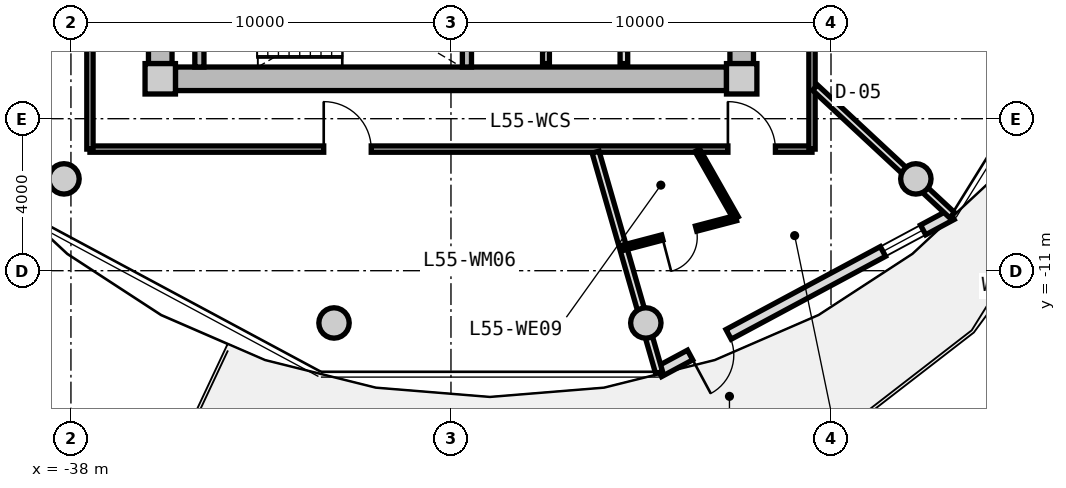
"""IFC4 building model, lengths in metres.
Left out: names, types, materials, properties, quantities, classifications, styles, units other than length and angle.
Written with IfcOpenShell. Run it as: python <this file> out.ifc"""

import sys

from ifc_helpers import new_model, si_unit, direction, frame, frame_2d, origin, origin_2d, place, context, subcontext, project, spatial, rectangle, circle, extrude, source, transform, mapped, element, fill, save


model = new_model("IFC4")
c1 = context("Model", 3, precision=1e-05, world=origin(), true_north=direction((0.0, 1.0)))
c2 = subcontext(c1, "Body", "Model", "MODEL_VIEW")
j1 = project(units=[si_unit("LENGTHUNIT", "METRE"), si_unit("PLANEANGLEUNIT", "RADIAN")], contexts=[c1])
p1 = place(None, origin())
s1 = spatial("IfcSite", under=j1, at=p1, CompositionType="ELEMENT")
p2 = place(p1, origin())
s2 = spatial("IfcBuilding", under=s1, at=p2, CompositionType="ELEMENT")
p3 = place(p2, frame((0.0, 0.0, 177.0)))
s3 = spatial("IfcBuildingStorey", under=s2, at=p3, CompositionType="ELEMENT", Elevation=177.0)
m1 = source(origin(), c2, "Body", "SweptSolid", [
    extrude(rectangle(XDim=0.8, YDim=0.8, at=origin_2d()), origin(), (0.0, 0.0, 1.0), 3.05),
])
for number, where, z_axis, x_axis in (
    (1, (-35.65, -5.95, 0.0), (0.0, 0.0, 1.0), (1.0, 0.0, 0.0)),
    (2, (-20.35, -5.95, 0.0), (0.0, 0.0, 1.0), (1.0, 0.0, 0.0)),
):
    element("IfcColumn", number, at=place(p3, frame(where, z_axis=z_axis, x_axis=x_axis)), inside=s3, PredefinedType="COLUMN", context=c2, shape_type="MappedRepresentation", body=[
        mapped(m1, transform((0.0, 0.0, 0.0), x_axis=(1.0, 0.0, 0.0), y_axis=(0.0, 1.0, 0.0), z_axis=(0.0, 0.0, 1.0), scale=1.0)),
    ])
m2 = source(origin(), c2, "Body", "SweptSolid", [
    extrude(rectangle(XDim=14.5, YDim=0.62, at=frame_2d((7.25, 0.0))), origin(), (0.0, 0.0, 1.0), 2.81),
])
p4 = place(p3, frame((-20.75, -5.95, 0.0), z_axis=(0.0, 0.0, 1.0), x_axis=(-1.0, 0.0, 0.0)))
e3 = element("IfcWall", 3, at=p4, inside=s3, PredefinedType="SHEAR", context=c2, shape_type="MappedRepresentation", body=[
    mapped(m2, transform((0.0, 0.0, 0.0), x_axis=(1.0, 0.0, 0.0), y_axis=(0.0, 1.0, 0.0), z_axis=(0.0, 0.0, 1.0), scale=1.0)),
])
m3 = source(origin(), c2, "Body", "SweptSolid", [
    extrude(rectangle(XDim=11.1, YDim=0.62, at=frame_2d((5.55, 0.0))), origin(), (0.0, 0.0, 1.0), 2.81),
])
p5 = place(p3, frame((-35.65, -5.55, 0.0), z_axis=(0.0, 0.0, 1.0), x_axis=(0.0, 1.0, 0.0)))
e4 = element("IfcWall", 4, at=p5, inside=s3, PredefinedType="SHEAR", context=c2, shape_type="MappedRepresentation", body=[
    mapped(m3, transform((0.0, 0.0, 0.0), x_axis=(1.0, 0.0, 0.0), y_axis=(0.0, 1.0, 0.0), z_axis=(0.0, 0.0, 1.0), scale=1.0)),
])
p6 = place(p5, frame((3.8, 0.0, 0.0)))
e5 = element("IfcOpeningElement", 5, at=p6, cuts=e4, PredefinedType="OPENING", context=c2, shape_type="SweptSolid", body=[
    extrude(rectangle(XDim=1.2, YDim=2.15, at=frame_2d((0.6, 1.075))), frame((0.0, 0.32, 0.0), z_axis=(0.0, -1.0, 0.0), x_axis=(1.0, 0.0, 0.0)), (0.0, 0.0, 1.0), 0.64),
])
p7 = place(p3, frame((-20.35, 5.55, 0.0), z_axis=(0.0, 0.0, 1.0), x_axis=(0.0, -1.0, 0.0)))
e6 = element("IfcWall", 6, at=p7, inside=s3, PredefinedType="SHEAR", context=c2, shape_type="MappedRepresentation", body=[
    mapped(m3, transform((0.0, 0.0, 0.0), x_axis=(1.0, 0.0, 0.0), y_axis=(0.0, 1.0, 0.0), z_axis=(0.0, 0.0, 1.0), scale=1.0)),
])
p8 = place(p7, frame((5.65, 0.0, 0.0)))
e7 = element("IfcOpeningElement", 7, at=p8, cuts=e6, PredefinedType="OPENING", context=c2, shape_type="SweptSolid", body=[
    extrude(rectangle(XDim=1.2, YDim=2.15, at=frame_2d((0.6, 1.075))), frame((0.0, 0.32, 0.0), z_axis=(0.0, -1.0, 0.0), x_axis=(1.0, 0.0, 0.0)), (0.0, 0.0, 1.0), 0.64),
])
m4 = source(origin(), c2, "Body", "SweptSolid", [
    extrude(circle(Radius=0.4, at=origin_2d()), origin(), (0.0, 0.0, 1.0), 3.05),
])
for number, where, z_axis, x_axis in (
    (8, (-38.183, -8.584, 0.0), (0.0, 0.0, 1.0), (1.0, 0.0, 0.0)),
    (9, (-31.077, -12.375, 0.0), (0.0, 0.0, 1.0), (1.0, 0.0, 0.0)),
    (10, (-22.873, -12.375, 0.0), (0.0, 0.0, 1.0), (1.0, 0.0, 0.0)),
    (11, (-15.767, -8.584, 0.0), (0.0, 0.0, 1.0), (1.0, 0.0, 0.0)),
):
    element("IfcColumn", number, at=place(p3, frame(where, z_axis=z_axis, x_axis=x_axis)), inside=s3, PredefinedType="COLUMN", context=c2, shape_type="MappedRepresentation", body=[
        mapped(m4, transform((0.0, 0.0, 0.0), x_axis=(1.0, 0.0, 0.0), y_axis=(0.0, 1.0, 0.0), z_axis=(0.0, 0.0, 1.0), scale=1.0)),
    ])
m5 = source(origin(), c2, "Body", "SweptSolid", [
    extrude(rectangle(XDim=8.742, YDim=0.29, at=frame_2d((4.371, 0.0))), origin(), (0.0, 0.0, 1.0), 2.81),
])
p9 = place(p3, frame((-14.827, -9.524, 0.0), z_axis=(0.0, 0.0, 1.0), x_axis=(-0.880998740657, -0.473118609823, 0.0)))
e12 = element("IfcWall", 12, at=p9, inside=s3, PredefinedType="SOLIDWALL", context=c2, shape_type="MappedRepresentation", body=[
    mapped(m5, transform((0.0, 0.0, 0.0), x_axis=(1.0, 0.0, 0.0), y_axis=(0.0, 1.0, 0.0), z_axis=(0.0, 0.0, 1.0), scale=1.0)),
])
p10 = place(p9, frame((6.66, 0.0, 0.0)))
e13 = element("IfcOpeningElement", 13, at=p10, cuts=e12, PredefinedType="OPENING", context=c2, shape_type="SweptSolid", body=[
    extrude(rectangle(XDim=1.15, YDim=2.25, at=frame_2d((0.575, 1.125))), frame((0.0, 0.155, 0.0), z_axis=(0.0, -1.0, 0.0), x_axis=(1.0, 0.0, 0.0)), (0.0, 0.0, 1.0), 0.31),
])
p11 = place(p9, frame((0.85, 0.0, 0.85)))
e14 = element("IfcOpeningElement", 14, at=p11, cuts=e12, PredefinedType="OPENING", context=c2, shape_type="SweptSolid", body=[
    extrude(rectangle(XDim=1.2, YDim=1.5, at=frame_2d((0.6, 0.75))), frame((0.0, 0.155, 0.0), z_axis=(0.0, -1.0, 0.0), x_axis=(1.0, 0.0, 0.0)), (0.0, 0.0, 1.0), 0.31),
])
m6 = source(origin(), c2, "Body", "SweptSolid", [
    extrude(rectangle(XDim=3.19, YDim=0.24, at=frame_2d((1.595, 0.0))), origin(), (0.0, 0.0, 1.0), 2.81),
])
for number, where, z_axis, x_axis in (
    (15, (-34.62, -5.64, 0.0), (0.0, 0.0, 1.0), (0.0, 1.0, 0.0)),
    (16, (-27.58, -5.64, 0.0), (0.0, 0.0, 1.0), (0.0, 1.0, 0.0)),
):
    element("IfcWall", number, at=place(p3, frame(where, z_axis=z_axis, x_axis=x_axis)), inside=s3, PredefinedType="PARTITIONING", context=c2, shape_type="MappedRepresentation", body=[
        mapped(m6, transform((0.0, 0.0, 0.0), x_axis=(1.0, 0.0, 0.0), y_axis=(0.0, 1.0, 0.0), z_axis=(0.0, 0.0, 1.0), scale=1.0)),
    ])
m7 = source(origin(), c2, "Body", "SweptSolid", [
    extrude(rectangle(XDim=3.8, YDim=0.2, at=frame_2d((1.9, 0.0))), origin(), (0.0, 0.0, 1.0), 2.795),
])
p12 = place(p3, frame((-23.45, -5.55, 0.0), z_axis=(0.0, 0.0, 1.0), x_axis=(0.0, 1.0, 0.0)))
e17 = element("IfcWall", 17, at=p12, inside=s3, PredefinedType="PARTITIONING", context=c2, shape_type="MappedRepresentation", body=[
    mapped(m7, transform((0.0, 0.0, 0.0), x_axis=(1.0, 0.0, 0.0), y_axis=(0.0, 1.0, 0.0), z_axis=(0.0, 0.0, 1.0), scale=1.0)),
])
m8 = source(origin(), c2, "Body", "SweptSolid", [
    extrude(rectangle(XDim=4.2, YDim=0.18, at=frame_2d((2.1, 0.0))), origin(), (0.0, 0.0, 1.0), 2.795),
])
p13 = place(p3, frame((-25.5, -5.55, 0.0), z_axis=(0.0, 0.0, 1.0), x_axis=(0.0, 1.0, 0.0)))
e18 = element("IfcWall", 18, at=p13, inside=s3, PredefinedType="PARTITIONING", context=c2, shape_type="MappedRepresentation", body=[
    mapped(m8, transform((0.0, 0.0, 0.0), x_axis=(1.0, 0.0, 0.0), y_axis=(0.0, 1.0, 0.0), z_axis=(0.0, 0.0, 1.0), scale=1.0)),
])
m9 = source(origin(), c2, "Body", "SweptSolid", [
    extrude(rectangle(XDim=19.0, YDim=0.165, at=frame_2d((9.5, 0.0))), origin(), (0.0, 0.0, 1.0), 2.795),
])
p14 = place(p3, frame((-18.5, -7.8, 0.0), z_axis=(0.0, 0.0, 1.0), x_axis=(-1.0, 0.0, 0.0)))
e19 = element("IfcWall", 19, at=p14, inside=s3, PredefinedType="PARTITIONING", context=c2, shape_type="MappedRepresentation", body=[
    mapped(m9, transform((0.0, 0.0, 0.0), x_axis=(1.0, 0.0, 0.0), y_axis=(0.0, 1.0, 0.0), z_axis=(0.0, 0.0, 1.0), scale=1.0)),
])
p15 = place(p14, frame((11.598, 0.0, 0.0)))
e20 = element("IfcOpeningElement", 20, at=p15, cuts=e19, PredefinedType="OPENING", context=c2, shape_type="SweptSolid", body=[
    extrude(rectangle(XDim=1.25, YDim=2.2, at=frame_2d((0.625, 1.1))), frame((0.0, 0.093, 0.0), z_axis=(0.0, -1.0, 0.0), x_axis=(1.0, 0.0, 0.0)), (0.0, 0.0, 1.0), 0.185),
])
p16 = place(p14, frame((0.963, 0.0, 0.0)))
e21 = element("IfcOpeningElement", 21, at=p16, cuts=e19, PredefinedType="OPENING", context=c2, shape_type="SweptSolid", body=[
    extrude(rectangle(XDim=1.25, YDim=2.2, at=frame_2d((0.625, 1.1))), frame((0.0, 0.093, 0.0), z_axis=(0.0, -1.0, 0.0), x_axis=(1.0, 0.0, 0.0)), (0.0, 0.0, 1.0), 0.185),
])
m10 = source(origin(), c2, "Body", "SweptSolid", [
    extrude(rectangle(XDim=6.88, YDim=0.165, at=frame_2d((3.44, 0.0))), origin(), (0.0, 0.0, 1.0), 2.795),
])
p17 = place(p3, frame((-37.5, -7.8, 0.0), z_axis=(0.0, 0.0, 1.0), x_axis=(0.0, 1.0, 0.0)))
e22 = element("IfcWall", 22, at=p17, inside=s3, PredefinedType="PARTITIONING", context=c2, shape_type="MappedRepresentation", body=[
    mapped(m10, transform((0.0, 0.0, 0.0), x_axis=(1.0, 0.0, 0.0), y_axis=(0.0, 1.0, 0.0), z_axis=(0.0, 0.0, 1.0), scale=1.0)),
])
m11 = source(origin(), c2, "Body", "SweptSolid", [
    extrude(rectangle(XDim=7.365, YDim=0.165, at=frame_2d((3.682, 0.0))), origin(), (0.0, 0.0, 1.0), 2.795),
])
p18 = place(p3, frame((-18.5, -0.436, 0.0), z_axis=(0.0, 0.0, 1.0), x_axis=(0.0, -1.0, 0.0)))
e23 = element("IfcWall", 23, at=p18, inside=s3, PredefinedType="PARTITIONING", context=c2, shape_type="MappedRepresentation", body=[
    mapped(m11, transform((0.0, 0.0, 0.0), x_axis=(1.0, 0.0, 0.0), y_axis=(0.0, 1.0, 0.0), z_axis=(0.0, 0.0, 1.0), scale=1.0)),
])
p19 = place(p18, frame((2.433, 0.0, 0.0)))
e24 = element("IfcOpeningElement", 24, at=p19, cuts=e23, PredefinedType="OPENING", context=c2, shape_type="SweptSolid", body=[
    extrude(rectangle(XDim=1.25, YDim=2.2, at=frame_2d((0.625, 1.1))), frame((0.0, 0.093, 0.0), z_axis=(0.0, -1.0, 0.0), x_axis=(1.0, 0.0, 0.0)), (0.0, 0.0, 1.0), 0.185),
])
m12 = source(origin(), c2, "Body", "SweptSolid", [
    extrude(rectangle(XDim=6.035, YDim=0.19, at=frame_2d((3.018, 0.0))), origin(), (0.0, 0.0, 1.0), 2.345),
])
p20 = place(p3, frame((-24.194, -7.88, 0.0), z_axis=(0.0, 0.0, 1.0), x_axis=(0.276809454862, -0.960924828329, 0.0)))
e25 = element("IfcWall", 25, at=p20, inside=s3, PredefinedType="PARTITIONING", context=c2, shape_type="MappedRepresentation", body=[
    mapped(m12, transform((0.0, 0.0, 0.0), x_axis=(1.0, 0.0, 0.0), y_axis=(0.0, 1.0, 0.0), z_axis=(0.0, 0.0, 1.0), scale=1.0)),
])
m13 = source(origin(), c2, "Body", "SweptSolid", [
    extrude(rectangle(XDim=4.927, YDim=0.19, at=frame_2d((2.463, 0.0))), origin(), (0.0, 0.0, 1.0), 2.345),
])
p21 = place(p3, frame((-18.42, -6.183, 0.0), z_axis=(0.0, 0.0, 1.0), x_axis=(0.732191335987, -0.681098999783, 0.0)))
e26 = element("IfcWall", 26, at=p21, inside=s3, PredefinedType="PARTITIONING", context=c2, shape_type="MappedRepresentation", body=[
    mapped(m13, transform((0.0, 0.0, 0.0), x_axis=(1.0, 0.0, 0.0), y_axis=(0.0, 1.0, 0.0), z_axis=(0.0, 0.0, 1.0), scale=1.0)),
])
m14 = source(origin(), c2, "Body", "SweptSolid", [
    extrude(rectangle(XDim=2.055, YDim=0.14, at=frame_2d((1.027, 0.0))), origin(), (0.0, 0.0, 1.0), 2.795),
])
p22 = place(p3, frame((-21.516, -7.83, 0.0), z_axis=(0.0, 0.0, 1.0), x_axis=(0.494154336367, -0.869374195528, 0.0)))
e27 = element("IfcWall", 27, at=p22, inside=s3, PredefinedType="PARTITIONING", context=c2, shape_type="MappedRepresentation", body=[
    mapped(m14, transform((0.0, 0.0, 0.0), x_axis=(1.0, 0.0, 0.0), y_axis=(0.0, 1.0, 0.0), z_axis=(0.0, 0.0, 1.0), scale=1.0)),
])
m15 = source(origin(), c2, "Body", "SweptSolid", [
    extrude(rectangle(XDim=3.088, YDim=0.14, at=frame_2d((1.544, 0.0))), origin(), (0.0, 0.0, 1.0), 2.795),
])
p23 = place(p3, frame((-20.501, -9.616, 0.0), z_axis=(0.0, 0.0, 1.0), x_axis=(-0.967224898254, -0.253921240146, 0.0)))
e28 = element("IfcWall", 28, at=p23, inside=s3, PredefinedType="PARTITIONING", context=c2, shape_type="MappedRepresentation", body=[
    mapped(m15, transform((0.0, 0.0, 0.0), x_axis=(1.0, 0.0, 0.0), y_axis=(0.0, 1.0, 0.0), z_axis=(0.0, 0.0, 1.0), scale=1.0)),
])
p24 = place(p23, frame((1.084, 0.0, 0.0)))
e29 = element("IfcOpeningElement", 29, at=p24, cuts=e28, PredefinedType="OPENING", context=c2, shape_type="SweptSolid", body=[
    extrude(rectangle(XDim=0.92, YDim=2.1, at=frame_2d((0.46, 1.05))), frame((0.0, 0.08, 0.0), z_axis=(0.0, -1.0, 0.0), x_axis=(1.0, 0.0, 0.0)), (0.0, 0.0, 1.0), 0.16),
])
m16 = source(origin(), c2, "Body", "SweptSolid", [
    extrude(rectangle(XDim=1.15, YDim=2.25, at=frame_2d((0.575, 1.125))), frame((0.0, 0.025, 0.0), z_axis=(0.0, -1.0, 0.0), x_axis=(1.0, 0.0, 0.0)), (0.0, 0.0, 1.0), 0.05),
])
p25 = place(p10, origin())
e30 = element("IfcDoor", 30, at=p25, inside=s3, OperationType="SINGLE_SWING_RIGHT", PredefinedType="DOOR", context=c2, shape_type="MappedRepresentation", body=[
    mapped(m16, transform((0.0, 0.0, 0.0), x_axis=(1.0, 0.0, 0.0), y_axis=(0.0, 1.0, 0.0), z_axis=(0.0, 0.0, 1.0), scale=1.0)),
])
fill(e13, e30)
m17 = source(origin(), c2, "Body", "SweptSolid", [
    extrude(rectangle(XDim=1.2, YDim=1.5, at=frame_2d((0.6, 0.75))), frame((0.0, 0.03, 0.0), z_axis=(0.0, -1.0, 0.0), x_axis=(1.0, 0.0, 0.0)), (0.0, 0.0, 1.0), 0.06),
])
p26 = place(p11, origin())
e31 = element("IfcWindow", 31, at=p26, inside=s3, PartitioningType="SINGLE_PANEL", PredefinedType="WINDOW", context=c2, shape_type="MappedRepresentation", body=[
    mapped(m17, transform((0.0, 0.0, 0.0), x_axis=(1.0, 0.0, 0.0), y_axis=(0.0, 1.0, 0.0), z_axis=(0.0, 0.0, 1.0), scale=1.0)),
])
fill(e14, e31)
m18 = source(origin(), c2, "Body", "SweptSolid", [
    extrude(rectangle(XDim=1.25, YDim=2.2, at=frame_2d((0.625, 1.1))), frame((0.0, 0.025, 0.0), z_axis=(0.0, -1.0, 0.0), x_axis=(1.0, 0.0, 0.0)), (0.0, 0.0, 1.0), 0.05),
])
p27 = place(p15, frame((1.25, 0.0, 0.0), z_axis=(0.0, 0.0, 1.0), x_axis=(-1.0, 0.0, 0.0)))
e32 = element("IfcDoor", 32, at=p27, inside=s3, OperationType="SINGLE_SWING_LEFT", PredefinedType="DOOR", context=c2, shape_type="MappedRepresentation", body=[
    mapped(m18, transform((0.0, 0.0, 0.0), x_axis=(1.0, 0.0, 0.0), y_axis=(0.0, 1.0, 0.0), z_axis=(0.0, 0.0, 1.0), scale=1.0)),
])
fill(e20, e32)
p28 = place(p16, frame((1.25, 0.0, 0.0), z_axis=(0.0, 0.0, 1.0), x_axis=(-1.0, 0.0, 0.0)))
e33 = element("IfcDoor", 33, at=p28, inside=s3, OperationType="SINGLE_SWING_LEFT", PredefinedType="DOOR", context=c2, shape_type="MappedRepresentation", body=[
    mapped(m18, transform((0.0, 0.0, 0.0), x_axis=(1.0, 0.0, 0.0), y_axis=(0.0, 1.0, 0.0), z_axis=(0.0, 0.0, 1.0), scale=1.0)),
])
fill(e21, e33)
m19 = source(origin(), c2, "Body", "SweptSolid", [
    extrude(rectangle(XDim=0.92, YDim=2.1, at=frame_2d((0.46, 1.05))), frame((0.0, 0.025, 0.0), z_axis=(0.0, -1.0, 0.0), x_axis=(1.0, 0.0, 0.0)), (0.0, 0.0, 1.0), 0.05),
])
p29 = place(p24, origin())
e34 = element("IfcDoor", 34, at=p29, inside=s3, OperationType="SINGLE_SWING_RIGHT", PredefinedType="DOOR", context=c2, shape_type="MappedRepresentation", body=[
    mapped(m19, transform((0.0, 0.0, 0.0), x_axis=(1.0, 0.0, 0.0), y_axis=(0.0, 1.0, 0.0), z_axis=(0.0, 0.0, 1.0), scale=1.0)),
])
fill(e29, e34)
save(model, sys.argv[1])
